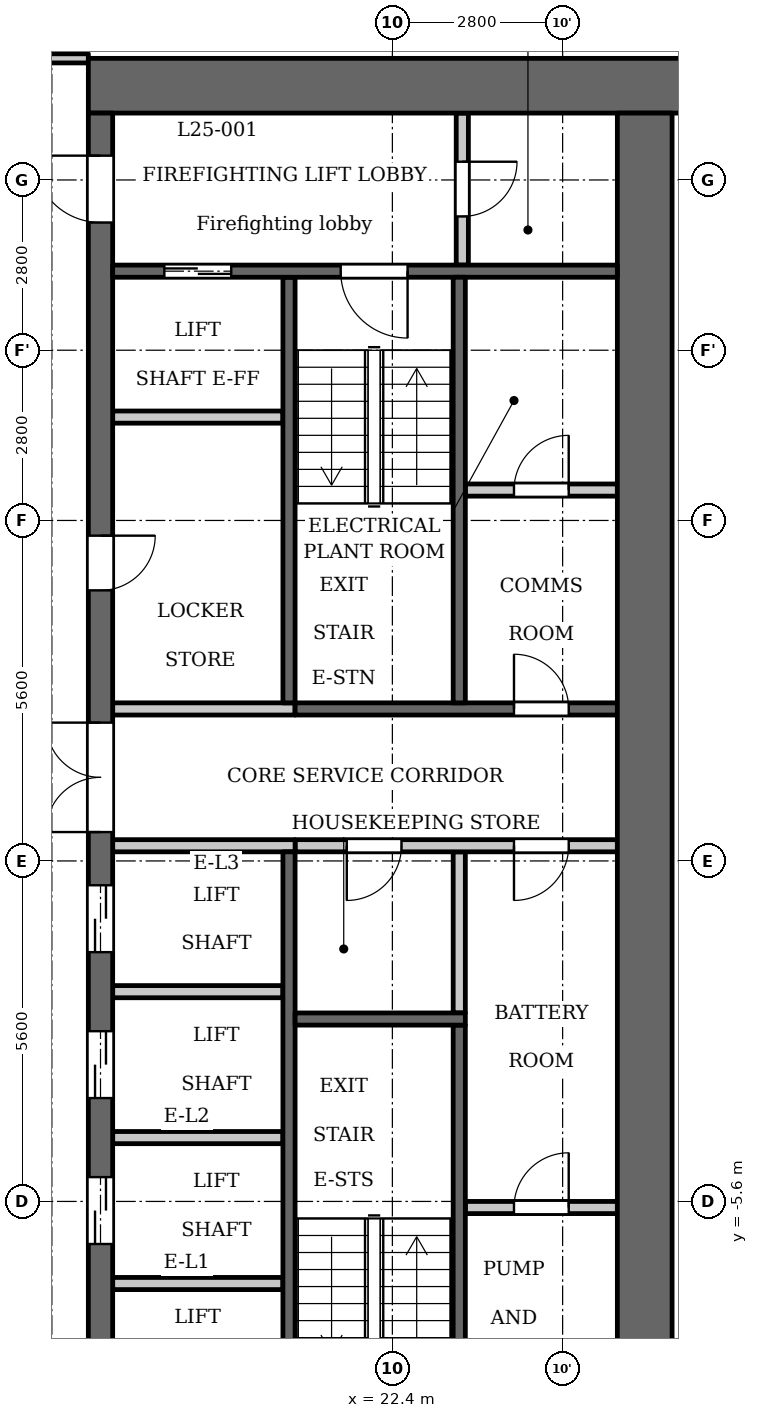
"""IFC4 building model, lengths in metres.
Left out: names, types, materials, properties, quantities, classifications, styles, units other than length and angle.
Written with IfcOpenShell. Run it as: python <this file> out.ifc"""

import sys

from ifc_helpers import new_model, si_unit, direction, frame, frame_2d, origin, place, context, subcontext, project, spatial, rectangle, extrude, element, fill, save


model = new_model("IFC4")
c1 = context("Model", 3, precision=1e-05, world=origin(), true_north=direction((0.0, 1.0)))
c2 = subcontext(c1, "Body", "Model", "MODEL_VIEW")
j1 = project(units=[si_unit("LENGTHUNIT", "METRE"), si_unit("PLANEANGLEUNIT", "RADIAN")], contexts=[c1])
p1 = place(None, origin())
s1 = spatial("IfcSite", under=j1, at=p1, CompositionType="ELEMENT")
p2 = place(p1, origin())
s2 = spatial("IfcBuilding", under=s1, at=p2, CompositionType="ELEMENT")
p3 = place(p2, frame((0.0, 0.0, 100.8)))
s3 = spatial("IfcBuildingStorey", under=s2, at=p3, CompositionType="ELEMENT", Elevation=100.8)
p4 = place(p3, frame((23.5, -2.5, 0.0), z_axis=(0.0, 0.0, 1.0), x_axis=(0.0, 1.0, 0.0)))
e1 = element("IfcWall", 1, at=p4, inside=s3, PredefinedType="PARTITIONING", context=c2, shape_type="SweptSolid", body=[
    extrude(rectangle(XDim=2.65, YDim=0.2, at=frame_2d((1.325, 0.0))), origin(), (0.0, 0.0, 1.0), 3.2),
])
p5 = place(p3, frame((20.7, 2.6, 0.0), z_axis=(0.0, 0.0, 1.0), x_axis=(0.0, 1.0, 0.0)))
e2 = element("IfcWall", 2, at=p5, inside=s3, PredefinedType="SHEAR", context=c2, shape_type="SweptSolid", body=[
    extrude(rectangle(XDim=7.0, YDim=0.2, at=frame_2d((3.5, 0.0))), origin(), (0.0, 0.0, 1.0), 3.2),
])
p6 = place(p3, frame((20.7, -9.6, 0.0), z_axis=(0.0, 0.0, 1.0), x_axis=(0.0, 1.0, 0.0)))
e3 = element("IfcWall", 3, at=p6, inside=s3, PredefinedType="SHEAR", context=c2, shape_type="SweptSolid", body=[
    extrude(rectangle(XDim=9.75, YDim=0.2, at=frame_2d((4.875, 0.0))), origin(), (0.0, 0.0, 1.0), 3.2),
])
p7 = place(p3, frame((20.8, 2.5, 0.0), z_axis=(0.0, 0.0, 1.0), x_axis=(1.0, 0.0, 0.0)))
e4 = element("IfcWall", 4, at=p7, inside=s3, PredefinedType="SHEAR", context=c2, shape_type="SweptSolid", body=[
    extrude(rectangle(XDim=5.3, YDim=0.2, at=frame_2d((2.65, 0.0))), origin(), (0.0, 0.0, 1.0), 3.2),
])
p8 = place(p7, frame((3.6, 0.0, 0.0)))
e5 = element("IfcOpeningElement", 5, at=p8, cuts=e4, PredefinedType="OPENING", context=c2, shape_type="SweptSolid", body=[
    extrude(rectangle(XDim=0.9, YDim=2.1, at=frame_2d((0.45, 1.05))), frame((0.0, 0.11, 0.0), z_axis=(0.0, -1.0, 0.0), x_axis=(1.0, 0.0, 0.0)), (0.0, 0.0, 1.0), 0.22),
])
p9 = place(p3, frame((20.8, 0.25, 0.0), z_axis=(0.0, 0.0, 1.0), x_axis=(1.0, 0.0, 0.0)))
e6 = element("IfcWall", 6, at=p9, inside=s3, PredefinedType="PARTITIONING", context=c2, shape_type="SweptSolid", body=[
    extrude(rectangle(XDim=5.3, YDim=0.2, at=frame_2d((2.65, 0.0))), origin(), (0.0, 0.0, 1.0), 3.2),
])
p10 = place(p9, frame((0.85, 0.0, 0.0)))
e7 = element("IfcOpeningElement", 7, at=p10, cuts=e6, PredefinedType="OPENING", context=c2, shape_type="SweptSolid", body=[
    extrude(rectangle(XDim=0.9, YDim=2.1, at=frame_2d((0.45, 1.05))), frame((0.0, 0.11, 0.0), z_axis=(0.0, -1.0, 0.0), x_axis=(1.0, 0.0, 0.0)), (0.0, 0.0, 1.0), 0.22),
])
p11 = place(p9, frame((3.6, 0.0, 0.0)))
e8 = element("IfcOpeningElement", 8, at=p11, cuts=e6, PredefinedType="OPENING", context=c2, shape_type="SweptSolid", body=[
    extrude(rectangle(XDim=0.9, YDim=2.1, at=frame_2d((0.45, 1.05))), frame((0.0, 0.11, 0.0), z_axis=(0.0, -1.0, 0.0), x_axis=(1.0, 0.0, 0.0)), (0.0, 0.0, 1.0), 0.22),
])
p12 = place(p3, frame((17.4, 12.75, 0.0), z_axis=(0.0, 0.0, 1.0), x_axis=(1.0, 0.0, 0.0)))
e9 = element("IfcWall", 9, at=p12, inside=s3, PredefinedType="SHEAR", context=c2, shape_type="SweptSolid", body=[
    extrude(rectangle(XDim=10.4, YDim=0.9, at=frame_2d((5.2, 0.0))), origin(), (0.0, 0.0, 1.0), 3.2),
])
p13 = place(p3, frame((17.6, -12.3, 0.0), z_axis=(0.0, 0.0, 1.0), x_axis=(0.0, 1.0, 0.0)))
e10 = element("IfcWall", 10, at=p13, inside=s3, PredefinedType="SHEAR", context=c2, shape_type="SweptSolid", body=[
    extrude(rectangle(XDim=24.6, YDim=0.4, at=frame_2d((12.3, 0.0))), origin(), (0.0, 0.0, 1.0), 3.2),
])
p14 = place(p13, frame((6.0, 0.0, 0.0)))
e11 = element("IfcOpeningElement", 11, at=p14, cuts=e10, PredefinedType="OPENING", context=c2, shape_type="SweptSolid", body=[
    extrude(rectangle(XDim=1.1, YDim=2.1, at=frame_2d((0.55, 1.05))), frame((0.0, 0.21, 0.0), z_axis=(0.0, -1.0, 0.0), x_axis=(1.0, 0.0, 0.0)), (0.0, 0.0, 1.0), 0.42),
])
p15 = place(p13, frame((8.4, 0.0, 0.0)))
e12 = element("IfcOpeningElement", 12, at=p15, cuts=e10, PredefinedType="OPENING", context=c2, shape_type="SweptSolid", body=[
    extrude(rectangle(XDim=1.1, YDim=2.1, at=frame_2d((0.55, 1.05))), frame((0.0, 0.21, 0.0), z_axis=(0.0, -1.0, 0.0), x_axis=(1.0, 0.0, 0.0)), (0.0, 0.0, 1.0), 0.42),
])
p16 = place(p13, frame((10.8, 0.0, 0.0)))
e13 = element("IfcOpeningElement", 13, at=p16, cuts=e10, PredefinedType="OPENING", context=c2, shape_type="SweptSolid", body=[
    extrude(rectangle(XDim=1.1, YDim=2.1, at=frame_2d((0.55, 1.05))), frame((0.0, 0.21, 0.0), z_axis=(0.0, -1.0, 0.0), x_axis=(1.0, 0.0, 0.0)), (0.0, 0.0, 1.0), 0.42),
])
p17 = place(p13, frame((16.75, 0.0, 0.0)))
e14 = element("IfcOpeningElement", 14, at=p17, cuts=e10, PredefinedType="OPENING", context=c2, shape_type="SweptSolid", body=[
    extrude(rectangle(XDim=0.9, YDim=2.1, at=frame_2d((0.45, 1.05))), frame((0.0, 0.21, 0.0), z_axis=(0.0, -1.0, 0.0), x_axis=(1.0, 0.0, 0.0)), (0.0, 0.0, 1.0), 0.42),
])
p18 = place(p13, frame((22.8, 0.0, 0.0)))
e15 = element("IfcOpeningElement", 15, at=p18, cuts=e10, PredefinedType="OPENING", context=c2, shape_type="SweptSolid", body=[
    extrude(rectangle(XDim=1.1, YDim=2.1, at=frame_2d((0.55, 1.05))), frame((0.0, 0.21, 0.0), z_axis=(0.0, -1.0, 0.0), x_axis=(1.0, 0.0, 0.0)), (0.0, 0.0, 1.0), 0.42),
])
p19 = place(p13, frame((0.7, 0.0, 0.0)))
e16 = element("IfcOpeningElement", 16, at=p19, cuts=e10, PredefinedType="OPENING", context=c2, shape_type="SweptSolid", body=[
    extrude(rectangle(XDim=1.1, YDim=2.1, at=frame_2d((0.55, 1.05))), frame((0.0, 0.21, 0.0), z_axis=(0.0, -1.0, 0.0), x_axis=(1.0, 0.0, 0.0)), (0.0, 0.0, 1.0), 0.42),
])
p20 = place(p13, frame((12.775, 0.0, 0.0)))
e17 = element("IfcOpeningElement", 17, at=p20, cuts=e10, PredefinedType="OPENING", context=c2, shape_type="SweptSolid", body=[
    extrude(rectangle(XDim=1.8, YDim=2.1, at=frame_2d((0.9, 1.05))), frame((0.0, 0.21, 0.0), z_axis=(0.0, -1.0, 0.0), x_axis=(1.0, 0.0, 0.0)), (0.0, 0.0, 1.0), 0.42),
])
p21 = place(p3, frame((26.55, -12.3, 0.0), z_axis=(0.0, 0.0, 1.0), x_axis=(0.0, 1.0, 0.0)))
e18 = element("IfcWall", 18, at=p21, inside=s3, PredefinedType="SHEAR", context=c2, shape_type="SweptSolid", body=[
    extrude(rectangle(XDim=24.6, YDim=0.9, at=frame_2d((12.3, 0.0))), origin(), (0.0, 0.0, 1.0), 3.2),
])
p22 = place(p3, frame((23.55, 9.8, 0.0), z_axis=(0.0, 0.0, 1.0), x_axis=(0.0, 1.0, 0.0)))
e19 = element("IfcWall", 19, at=p22, inside=s3, PredefinedType="PARTITIONING", context=c2, shape_type="SweptSolid", body=[
    extrude(rectangle(XDim=2.5, YDim=0.2, at=frame_2d((1.25, 0.0))), origin(), (0.0, 0.0, 1.0), 3.2),
])
p23 = place(p22, frame((0.8, 0.0, 0.0)))
e20 = element("IfcOpeningElement", 20, at=p23, cuts=e19, PredefinedType="OPENING", context=c2, shape_type="SweptSolid", body=[
    extrude(rectangle(XDim=0.9, YDim=2.1, at=frame_2d((0.45, 1.05))), frame((0.0, 0.11, 0.0), z_axis=(0.0, -1.0, 0.0), x_axis=(1.0, 0.0, 0.0)), (0.0, 0.0, 1.0), 0.22),
])
p24 = place(p3, frame((23.6, -5.7, 0.0), z_axis=(0.0, 0.0, 1.0), x_axis=(1.0, 0.0, 0.0)))
e21 = element("IfcWall", 21, at=p24, inside=s3, PredefinedType="PARTITIONING", context=c2, shape_type="SweptSolid", body=[
    extrude(rectangle(XDim=2.5, YDim=0.2, at=frame_2d((1.25, 0.0))), origin(), (0.0, 0.0, 1.0), 3.2),
])
p25 = place(p24, frame((0.8, 0.0, 0.0)))
e22 = element("IfcOpeningElement", 22, at=p25, cuts=e21, PredefinedType="OPENING", context=c2, shape_type="SweptSolid", body=[
    extrude(rectangle(XDim=0.9, YDim=2.1, at=frame_2d((0.45, 1.05))), frame((0.0, 0.11, 0.0), z_axis=(0.0, -1.0, 0.0), x_axis=(1.0, 0.0, 0.0)), (0.0, 0.0, 1.0), 0.22),
])
p26 = place(p3, frame((23.6, 6.1, 0.0), z_axis=(0.0, 0.0, 1.0), x_axis=(1.0, 0.0, 0.0)))
e23 = element("IfcWall", 23, at=p26, inside=s3, PredefinedType="PARTITIONING", context=c2, shape_type="SweptSolid", body=[
    extrude(rectangle(XDim=2.5, YDim=0.2, at=frame_2d((1.25, 0.0))), origin(), (0.0, 0.0, 1.0), 3.2),
])
p27 = place(p26, frame((0.8, 0.0, 0.0)))
e24 = element("IfcOpeningElement", 24, at=p27, cuts=e23, PredefinedType="OPENING", context=c2, shape_type="SweptSolid", body=[
    extrude(rectangle(XDim=0.9, YDim=2.1, at=frame_2d((0.45, 1.05))), frame((0.0, 0.11, 0.0), z_axis=(0.0, -1.0, 0.0), x_axis=(1.0, 0.0, 0.0)), (0.0, 0.0, 1.0), 0.22),
])
for number, where, z_axis, x_axis in (
    (25, (17.8, -6.95, 0.0), (0.0, 0.0, 1.0), (1.0, 0.0, 0.0)),
    (26, (17.8, -4.55, 0.0), (0.0, 0.0, 1.0), (1.0, 0.0, 0.0)),
    (27, (17.8, -2.15, 0.0), (0.0, 0.0, 1.0), (1.0, 0.0, 0.0)),
):
    element("IfcWall", number, at=place(p3, frame(where, z_axis=z_axis, x_axis=x_axis)), inside=s3, PredefinedType="PARTITIONING", context=c2, shape_type="SweptSolid", body=[
        extrude(rectangle(XDim=2.8, YDim=0.2, at=frame_2d((1.4, 0.0))), origin(), (0.0, 0.0, 1.0), 3.2),
    ])
for number, where, z_axis, x_axis in (
    (28, (17.8, 0.25, 0.0), (0.0, 0.0, 1.0), (1.0, 0.0, 0.0)),
    (29, (17.8, 2.5, 0.0), (0.0, 0.0, 1.0), (1.0, 0.0, 0.0)),
):
    element("IfcWall", number, at=place(p3, frame(where, z_axis=z_axis, x_axis=x_axis)), inside=s3, PredefinedType="PARTITIONING", context=c2, shape_type="SweptSolid", body=[
        extrude(rectangle(XDim=3.0, YDim=0.2, at=frame_2d((1.5, 0.0))), origin(), (0.0, 0.0, 1.0), 3.2),
    ])
p28 = place(p3, frame((17.8, 7.3, 0.0), z_axis=(0.0, 0.0, 1.0), x_axis=(1.0, 0.0, 0.0)))
e30 = element("IfcWall", 30, at=p28, inside=s3, PredefinedType="PARTITIONING", context=c2, shape_type="SweptSolid", body=[
    extrude(rectangle(XDim=2.8, YDim=0.2, at=frame_2d((1.4, 0.0))), origin(), (0.0, 0.0, 1.0), 3.2),
])
p29 = place(p3, frame((17.8, 9.7, 0.0), z_axis=(0.0, 0.0, 1.0), x_axis=(1.0, 0.0, 0.0)))
e31 = element("IfcWall", 31, at=p29, inside=s3, PredefinedType="SHEAR", context=c2, shape_type="SweptSolid", body=[
    extrude(rectangle(XDim=8.3, YDim=0.2, at=frame_2d((4.15, 0.0))), origin(), (0.0, 0.0, 1.0), 3.2),
])
p30 = place(p29, frame((0.85, 0.0, 0.0)))
e32 = element("IfcOpeningElement", 32, at=p30, cuts=e31, PredefinedType="OPENING", context=c2, shape_type="SweptSolid", body=[
    extrude(rectangle(XDim=1.1, YDim=2.1, at=frame_2d((0.55, 1.05))), frame((0.0, 0.11, 0.0), z_axis=(0.0, -1.0, 0.0), x_axis=(1.0, 0.0, 0.0)), (0.0, 0.0, 1.0), 0.22),
])
p31 = place(p29, frame((3.75, 0.0, 0.0)))
e33 = element("IfcOpeningElement", 33, at=p31, cuts=e31, PredefinedType="OPENING", context=c2, shape_type="SweptSolid", body=[
    extrude(rectangle(XDim=1.1, YDim=2.1, at=frame_2d((0.55, 1.05))), frame((0.0, 0.11, 0.0), z_axis=(0.0, -1.0, 0.0), x_axis=(1.0, 0.0, 0.0)), (0.0, 0.0, 1.0), 0.22),
])
p32 = place(p3, frame((23.5, 2.6, 0.0), z_axis=(0.0, 0.0, 1.0), x_axis=(0.0, 1.0, 0.0)))
e34 = element("IfcWall", 34, at=p32, inside=s3, PredefinedType="SHEAR", context=c2, shape_type="SweptSolid", body=[
    extrude(rectangle(XDim=7.0, YDim=0.2, at=frame_2d((3.5, 0.0))), origin(), (0.0, 0.0, 1.0), 3.2),
])
p33 = place(p3, frame((23.5, -9.6, 0.0), z_axis=(0.0, 0.0, 1.0), x_axis=(0.0, 1.0, 0.0)))
e35 = element("IfcWall", 35, at=p33, inside=s3, PredefinedType="SHEAR", context=c2, shape_type="SweptSolid", body=[
    extrude(rectangle(XDim=6.9, YDim=0.2, at=frame_2d((3.45, 0.0))), origin(), (0.0, 0.0, 1.0), 3.2),
])
p34 = place(p3, frame((20.8, -2.6, 0.0), z_axis=(0.0, 0.0, 1.0), x_axis=(1.0, 0.0, 0.0)))
e36 = element("IfcWall", 36, at=p34, inside=s3, PredefinedType="SHEAR", context=c2, shape_type="SweptSolid", body=[
    extrude(rectangle(XDim=2.8, YDim=0.2, at=frame_2d((1.4, 0.0))), origin(), (0.0, 0.0, 1.0), 3.2),
])
p35 = place(p3, frame((-17.4, 13.2, 0.0), z_axis=(0.0, 0.0, 1.0), x_axis=(1.0, 0.0, 0.0)))
e37 = element("IfcWall", 37, at=p35, inside=s3, PredefinedType="PARTITIONING", context=c2, shape_type="SweptSolid", body=[
    extrude(rectangle(XDim=34.8, YDim=0.15, at=frame_2d((17.4, 0.0))), origin(), (0.0, 0.0, 1.0), 3.2),
])
p36 = place(p35, frame((0.75, 0.0, 0.0)))
e38 = element("IfcOpeningElement", 38, at=p36, cuts=e37, PredefinedType="OPENING", context=c2, shape_type="SweptSolid", body=[
    extrude(rectangle(XDim=1.0, YDim=2.1, at=frame_2d((0.5, 1.05))), frame((0.0, 0.085, 0.0), z_axis=(0.0, -1.0, 0.0), x_axis=(1.0, 0.0, 0.0)), (0.0, 0.0, 1.0), 0.17),
])
p37 = place(p35, frame((33.15, 0.0, 0.0)))
e39 = element("IfcOpeningElement", 39, at=p37, cuts=e37, PredefinedType="OPENING", context=c2, shape_type="SweptSolid", body=[
    extrude(rectangle(XDim=1.0, YDim=2.1, at=frame_2d((0.5, 1.05))), frame((0.0, 0.085, 0.0), z_axis=(0.0, -1.0, 0.0), x_axis=(1.0, 0.0, 0.0)), (0.0, 0.0, 1.0), 0.17),
])
p38 = place(p35, frame((6.85, 0.0, 0.0)))
e40 = element("IfcOpeningElement", 40, at=p38, cuts=e37, PredefinedType="OPENING", context=c2, shape_type="SweptSolid", body=[
    extrude(rectangle(XDim=1.0, YDim=2.1, at=frame_2d((0.5, 1.05))), frame((0.0, 0.085, 0.0), z_axis=(0.0, -1.0, 0.0), x_axis=(1.0, 0.0, 0.0)), (0.0, 0.0, 1.0), 0.17),
])
p39 = place(p35, frame((15.45, 0.0, 0.0)))
e41 = element("IfcOpeningElement", 41, at=p39, cuts=e37, PredefinedType="OPENING", context=c2, shape_type="SweptSolid", body=[
    extrude(rectangle(XDim=1.0, YDim=2.1, at=frame_2d((0.5, 1.05))), frame((0.0, 0.085, 0.0), z_axis=(0.0, -1.0, 0.0), x_axis=(1.0, 0.0, 0.0)), (0.0, 0.0, 1.0), 0.17),
])
p40 = place(p35, frame((21.4, 0.0, 0.0)))
e42 = element("IfcOpeningElement", 42, at=p40, cuts=e37, PredefinedType="OPENING", context=c2, shape_type="SweptSolid", body=[
    extrude(rectangle(XDim=1.0, YDim=2.1, at=frame_2d((0.5, 1.05))), frame((0.0, 0.085, 0.0), z_axis=(0.0, -1.0, 0.0), x_axis=(1.0, 0.0, 0.0)), (0.0, 0.0, 1.0), 0.17),
])
p41 = place(p35, frame((23.65, 0.0, 0.0)))
e43 = element("IfcOpeningElement", 43, at=p41, cuts=e37, PredefinedType="OPENING", context=c2, shape_type="SweptSolid", body=[
    extrude(rectangle(XDim=1.0, YDim=2.1, at=frame_2d((0.5, 1.05))), frame((0.0, 0.085, 0.0), z_axis=(0.0, -1.0, 0.0), x_axis=(1.0, 0.0, 0.0)), (0.0, 0.0, 1.0), 0.17),
])
p42 = place(p14, origin())
e44 = element("IfcDoor", 44, at=p42, inside=s3, OperationType="DOUBLE_DOOR_SLIDING", PredefinedType="DOOR", context=c2, shape_type="SweptSolid", body=[
    extrude(rectangle(XDim=1.1, YDim=2.1, at=frame_2d((0.55, 1.05))), frame((0.0, 0.025, 0.0), z_axis=(0.0, -1.0, 0.0), x_axis=(1.0, 0.0, 0.0)), (0.0, 0.0, 1.0), 0.05),
])
fill(e11, e44)
p43 = place(p15, origin())
e45 = element("IfcDoor", 45, at=p43, inside=s3, OperationType="DOUBLE_DOOR_SLIDING", PredefinedType="DOOR", context=c2, shape_type="SweptSolid", body=[
    extrude(rectangle(XDim=1.1, YDim=2.1, at=frame_2d((0.55, 1.05))), frame((0.0, 0.025, 0.0), z_axis=(0.0, -1.0, 0.0), x_axis=(1.0, 0.0, 0.0)), (0.0, 0.0, 1.0), 0.05),
])
fill(e12, e45)
p44 = place(p16, origin())
e46 = element("IfcDoor", 46, at=p44, inside=s3, OperationType="DOUBLE_DOOR_SLIDING", PredefinedType="DOOR", context=c2, shape_type="SweptSolid", body=[
    extrude(rectangle(XDim=1.1, YDim=2.1, at=frame_2d((0.55, 1.05))), frame((0.0, 0.025, 0.0), z_axis=(0.0, -1.0, 0.0), x_axis=(1.0, 0.0, 0.0)), (0.0, 0.0, 1.0), 0.05),
])
fill(e13, e46)
p45 = place(p17, origin())
e47 = element("IfcDoor", 47, at=p45, inside=s3, OperationType="SINGLE_SWING_RIGHT", PredefinedType="DOOR", context=c2, shape_type="SweptSolid", body=[
    extrude(rectangle(XDim=0.9, YDim=2.1, at=frame_2d((0.45, 1.05))), frame((0.0, 0.025, 0.0), z_axis=(0.0, -1.0, 0.0), x_axis=(1.0, 0.0, 0.0)), (0.0, 0.0, 1.0), 0.05),
])
fill(e14, e47)
p46 = place(p30, origin())
e48 = element("IfcDoor", 48, at=p46, inside=s3, OperationType="DOUBLE_DOOR_SLIDING", PredefinedType="DOOR", context=c2, shape_type="SweptSolid", body=[
    extrude(rectangle(XDim=1.1, YDim=2.1, at=frame_2d((0.55, 1.05))), frame((0.0, 0.025, 0.0), z_axis=(0.0, -1.0, 0.0), x_axis=(1.0, 0.0, 0.0)), (0.0, 0.0, 1.0), 0.05),
])
fill(e32, e48)
p47 = place(p18, origin())
e49 = element("IfcDoor", 49, at=p47, inside=s3, OperationType="SINGLE_SWING_LEFT", PredefinedType="DOOR", context=c2, shape_type="SweptSolid", body=[
    extrude(rectangle(XDim=1.1, YDim=2.1, at=frame_2d((0.55, 1.05))), frame((0.0, 0.025, 0.0), z_axis=(0.0, -1.0, 0.0), x_axis=(1.0, 0.0, 0.0)), (0.0, 0.0, 1.0), 0.05),
])
fill(e15, e49)
p48 = place(p23, origin())
e50 = element("IfcDoor", 50, at=p48, inside=s3, OperationType="SINGLE_SWING_RIGHT", PredefinedType="DOOR", context=c2, shape_type="SweptSolid", body=[
    extrude(rectangle(XDim=0.9, YDim=2.1, at=frame_2d((0.45, 1.05))), frame((0.0, 0.025, 0.0), z_axis=(0.0, -1.0, 0.0), x_axis=(1.0, 0.0, 0.0)), (0.0, 0.0, 1.0), 0.05),
])
fill(e20, e50)
p49 = place(p31, origin())
e51 = element("IfcDoor", 51, at=p49, inside=s3, OperationType="SINGLE_SWING_RIGHT", PredefinedType="DOOR", context=c2, shape_type="SweptSolid", body=[
    extrude(rectangle(XDim=1.1, YDim=2.1, at=frame_2d((0.55, 1.05))), frame((0.0, 0.025, 0.0), z_axis=(0.0, -1.0, 0.0), x_axis=(1.0, 0.0, 0.0)), (0.0, 0.0, 1.0), 0.05),
])
fill(e33, e51)
p50 = place(p20, origin())
e52 = element("IfcDoor", 52, at=p50, inside=s3, OperationType="DOUBLE_DOOR_SINGLE_SWING", PredefinedType="DOOR", context=c2, shape_type="SweptSolid", body=[
    extrude(rectangle(XDim=1.8, YDim=2.1, at=frame_2d((0.9, 1.05))), frame((0.0, 0.025, 0.0), z_axis=(0.0, -1.0, 0.0), x_axis=(1.0, 0.0, 0.0)), (0.0, 0.0, 1.0), 0.05),
])
fill(e17, e52)
p51 = place(p10, origin())
e53 = element("IfcDoor", 53, at=p51, inside=s3, OperationType="SINGLE_SWING_LEFT", PredefinedType="DOOR", context=c2, shape_type="SweptSolid", body=[
    extrude(rectangle(XDim=0.9, YDim=2.1, at=frame_2d((0.45, 1.05))), frame((0.0, 0.025, 0.0), z_axis=(0.0, -1.0, 0.0), x_axis=(1.0, 0.0, 0.0)), (0.0, 0.0, 1.0), 0.05),
])
fill(e7, e53)
p52 = place(p25, origin())
e54 = element("IfcDoor", 54, at=p52, inside=s3, OperationType="SINGLE_SWING_LEFT", PredefinedType="DOOR", context=c2, shape_type="SweptSolid", body=[
    extrude(rectangle(XDim=0.9, YDim=2.1, at=frame_2d((0.45, 1.05))), frame((0.0, 0.025, 0.0), z_axis=(0.0, -1.0, 0.0), x_axis=(1.0, 0.0, 0.0)), (0.0, 0.0, 1.0), 0.05),
])
fill(e22, e54)
p53 = place(p11, origin())
e55 = element("IfcDoor", 55, at=p53, inside=s3, OperationType="SINGLE_SWING_LEFT", PredefinedType="DOOR", context=c2, shape_type="SweptSolid", body=[
    extrude(rectangle(XDim=0.9, YDim=2.1, at=frame_2d((0.45, 1.05))), frame((0.0, 0.025, 0.0), z_axis=(0.0, -1.0, 0.0), x_axis=(1.0, 0.0, 0.0)), (0.0, 0.0, 1.0), 0.05),
])
fill(e8, e55)
p54 = place(p27, origin())
e56 = element("IfcDoor", 56, at=p54, inside=s3, OperationType="SINGLE_SWING_LEFT", PredefinedType="DOOR", context=c2, shape_type="SweptSolid", body=[
    extrude(rectangle(XDim=0.9, YDim=2.1, at=frame_2d((0.45, 1.05))), frame((0.0, 0.025, 0.0), z_axis=(0.0, -1.0, 0.0), x_axis=(1.0, 0.0, 0.0)), (0.0, 0.0, 1.0), 0.05),
])
fill(e24, e56)
p55 = place(p8, origin())
e57 = element("IfcDoor", 57, at=p55, inside=s3, OperationType="SINGLE_SWING_RIGHT", PredefinedType="DOOR", context=c2, shape_type="SweptSolid", body=[
    extrude(rectangle(XDim=0.9, YDim=2.1, at=frame_2d((0.45, 1.05))), frame((0.0, 0.025, 0.0), z_axis=(0.0, -1.0, 0.0), x_axis=(1.0, 0.0, 0.0)), (0.0, 0.0, 1.0), 0.05),
])
fill(e5, e57)
save(model, sys.argv[1])
